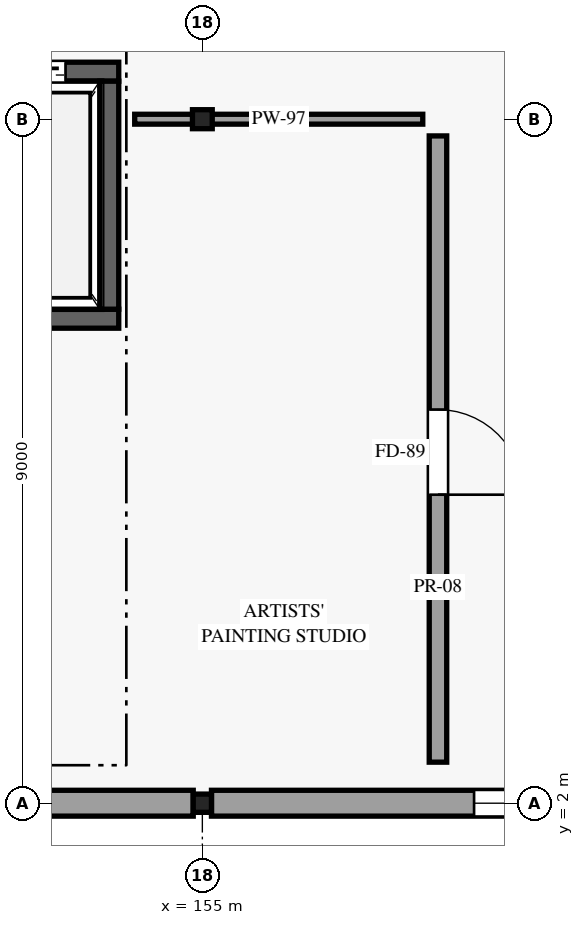
"""IFC4 building model, lengths in metres.
Left out: names, types, materials, properties, quantities, classifications, styles, units other than length and angle.
Written with IfcOpenShell. Run it as: python <this file> out.ifc"""

import sys

from ifc_helpers import new_model, si_unit, direction, frame, frame_2d, origin, origin_2d, place, context, subcontext, project, spatial, rectangle, i_section, extrude, element, fill, save


model = new_model("IFC4")
c1 = context("Model", 3, precision=1e-05, world=origin(), true_north=direction((0.0, 1.0)))
c2 = subcontext(c1, "Body", "Model", "MODEL_VIEW")
j1 = project(units=[si_unit("LENGTHUNIT", "METRE"), si_unit("PLANEANGLEUNIT", "RADIAN")], contexts=[c1])
p1 = place(None, origin())
s1 = spatial("IfcSite", under=j1, at=p1, CompositionType="ELEMENT")
p2 = place(p1, origin())
s2 = spatial("IfcBuilding", under=s1, at=p2, CompositionType="ELEMENT")
p3 = place(p2, frame((0.0, 0.0, 15.0)))
s3 = spatial("IfcBuildingStorey", under=s2, at=p3, CompositionType="ELEMENT", Elevation=15.0)
p4 = place(p3, frame((155.0, 2.0, 0.0), z_axis=(0.0, 0.0, 1.0), x_axis=(1.0, 0.0, 0.0)))
e1 = element("IfcColumn", 1, at=p4, inside=s3, PredefinedType="COLUMN", context=c2, shape_type="SweptSolid", body=[
    extrude(i_section(OverallWidth=0.24, OverallDepth=0.24, WebThickness=0.01, FlangeThickness=0.017, FilletRadius=0.021, at=origin_2d()), origin(), (0.0, 0.0, 1.0), 4.5),
])
p5 = place(p3, frame((155.0, 11.0, 0.0), z_axis=(0.0, 0.0, 1.0), x_axis=(1.0, 0.0, 0.0)))
e2 = element("IfcColumn", 2, at=p5, inside=s3, PredefinedType="COLUMN", context=c2, shape_type="SweptSolid", body=[
    extrude(i_section(OverallWidth=0.26, OverallDepth=0.25, WebThickness=0.008, FlangeThickness=0.012, FilletRadius=0.024, at=origin_2d()), origin(), (0.0, 0.0, 1.0), 4.5),
])
p6 = place(p3, frame((146.12, 2.0, 0.0), z_axis=(0.0, 0.0, 1.0), x_axis=(1.0, 0.0, 0.0)))
e3 = element("IfcWall", 3, at=p6, inside=s3, PredefinedType="STANDARD", context=c2, shape_type="SweptSolid", body=[
    extrude(rectangle(XDim=8.76, YDim=0.34, at=frame_2d((4.38, 0.0))), origin(), (0.0, 0.0, 1.0), 3.855),
])
p7 = place(p6, frame((5.205, 0.0, 0.85), z_axis=(0.0, 0.0, 1.0), x_axis=(-1.0, 0.0, 0.0)))
e4 = element("IfcOpeningElement", 4, at=p7, cuts=e3, PredefinedType="OPENING", context=c2, shape_type="SweptSolid", body=[
    extrude(rectangle(XDim=1.65, YDim=2.0, at=frame_2d((0.825, 1.0))), frame((0.0, 0.18, 0.0), z_axis=(0.0, -1.0, 0.0), x_axis=(1.0, 0.0, 0.0)), (0.0, 0.0, 1.0), 0.36),
])
p8 = place(p3, frame((155.12, 2.0, 0.0), z_axis=(0.0, 0.0, 1.0), x_axis=(1.0, 0.0, 0.0)))
e5 = element("IfcWall", 5, at=p8, inside=s3, PredefinedType="STANDARD", context=c2, shape_type="SweptSolid", body=[
    extrude(rectangle(XDim=8.76, YDim=0.34, at=frame_2d((4.38, 0.0))), origin(), (0.0, 0.0, 1.0), 3.855),
])
p9 = place(p8, frame((5.305, 0.0, 0.85), z_axis=(0.0, 0.0, 1.0), x_axis=(-1.0, 0.0, 0.0)))
e6 = element("IfcOpeningElement", 6, at=p9, cuts=e5, PredefinedType="OPENING", context=c2, shape_type="SweptSolid", body=[
    extrude(rectangle(XDim=1.85, YDim=2.1, at=frame_2d((0.925, 1.05))), frame((0.0, 0.18, 0.0), z_axis=(0.0, -1.0, 0.0), x_axis=(1.0, 0.0, 0.0)), (0.0, 0.0, 1.0), 0.36),
])
p10 = place(p3, frame((151.4, 11.625, 0.0), z_axis=(0.0, 0.0, 1.0), x_axis=(1.0, 0.0, 0.0)))
e7 = element("IfcWall", 7, at=p10, inside=s3, PredefinedType="SHEAR", context=c2, shape_type="SweptSolid", body=[
    extrude(rectangle(XDim=2.5, YDim=0.25, at=frame_2d((1.25, 0.0))), origin(), (0.0, 0.0, 1.0), 4.18),
])
p11 = place(p10, frame((0.7, 0.0, 0.0)))
e8 = element("IfcOpeningElement", 8, at=p11, cuts=e7, PredefinedType="OPENING", context=c2, shape_type="SweptSolid", body=[
    extrude(rectangle(XDim=1.1, YDim=2.2, at=frame_2d((0.55, 1.1))), frame((0.0, 0.135, 0.0), z_axis=(0.0, -1.0, 0.0), x_axis=(1.0, 0.0, 0.0)), (0.0, 0.0, 1.0), 0.27),
])
p12 = place(p3, frame((151.4, 8.375, 0.0), z_axis=(0.0, 0.0, 1.0), x_axis=(1.0, 0.0, 0.0)))
e9 = element("IfcWall", 9, at=p12, inside=s3, PredefinedType="SHEAR", context=c2, shape_type="SweptSolid", body=[
    extrude(rectangle(XDim=2.5, YDim=0.25, at=frame_2d((1.25, 0.0))), origin(), (0.0, 0.0, 1.0), 4.18),
])
p13 = place(p3, frame((153.775, 8.5, 0.0), z_axis=(0.0, 0.0, 1.0), x_axis=(0.0, 1.0, 0.0)))
e10 = element("IfcWall", 10, at=p13, inside=s3, PredefinedType="SHEAR", context=c2, shape_type="SweptSolid", body=[
    extrude(rectangle(XDim=3.0, YDim=0.25, at=frame_2d((1.5, 0.0))), origin(), (0.0, 0.0, 1.0), 4.18),
])
p14 = place(p3, frame((158.1, 2.54, 0.0), z_axis=(0.0, 0.0, 1.0), x_axis=(0.0, 1.0, 0.0)))
e11 = element("IfcWall", 11, at=p14, inside=s3, PredefinedType="PARTITIONING", context=c2, shape_type="SweptSolid", body=[
    extrude(rectangle(XDim=8.24, YDim=0.23, at=frame_2d((4.12, 0.0))), origin(), (0.0, 0.0, 1.0), 3.855),
])
p15 = place(p14, frame((4.639, 0.0, 0.0), z_axis=(0.0, 0.0, 1.0), x_axis=(-1.0, 0.0, 0.0)))
e12 = element("IfcOpeningElement", 12, at=p15, cuts=e11, PredefinedType="OPENING", context=c2, shape_type="SweptSolid", body=[
    extrude(rectangle(XDim=1.12, YDim=2.26, at=frame_2d((0.56, 1.13))), frame((0.0, 0.125, 0.0), z_axis=(0.0, -1.0, 0.0), x_axis=(1.0, 0.0, 0.0)), (0.0, 0.0, 1.0), 0.25),
])
p16 = place(p3, frame((154.11, 11.0, 0.0), z_axis=(0.0, 0.0, 1.0), x_axis=(1.0, 0.0, 0.0)))
e13 = element("IfcWall", 13, at=p16, inside=s3, PredefinedType="PARTITIONING", context=c2, shape_type="SweptSolid", body=[
    extrude(rectangle(XDim=3.79, YDim=0.13, at=frame_2d((1.895, 0.0))), origin(), (0.0, 0.0, 1.0), 3.855),
])
p17 = place(p9, origin())
e14 = element("IfcWindow", 14, at=p17, inside=s3, PartitioningType="SINGLE_PANEL", PredefinedType="WINDOW", context=c2, shape_type="SweptSolid", body=[
    extrude(rectangle(XDim=1.85, YDim=2.1, at=frame_2d((0.925, 1.05))), frame((0.0, 0.03, 0.0), z_axis=(0.0, -1.0, 0.0), x_axis=(1.0, 0.0, 0.0)), (0.0, 0.0, 1.0), 0.06),
])
fill(e6, e14)
p18 = place(p11, origin())
e15 = element("IfcDoor", 15, at=p18, inside=s3, OperationType="SLIDING_TO_LEFT", PredefinedType="DOOR", context=c2, shape_type="SweptSolid", body=[
    extrude(rectangle(XDim=1.1, YDim=2.2, at=frame_2d((0.55, 1.1))), frame((0.0, 0.025, 0.0), z_axis=(0.0, -1.0, 0.0), x_axis=(1.0, 0.0, 0.0)), (0.0, 0.0, 1.0), 0.05),
])
fill(e8, e15)
p19 = place(p15, origin())
e16 = element("IfcDoor", 16, at=p19, inside=s3, OperationType="SINGLE_SWING_RIGHT", PredefinedType="DOOR", context=c2, shape_type="SweptSolid", body=[
    extrude(rectangle(XDim=1.12, YDim=2.26, at=frame_2d((0.56, 1.13))), frame((0.0, 0.025, 0.0), z_axis=(0.0, -1.0, 0.0), x_axis=(1.0, 0.0, 0.0)), (0.0, 0.0, 1.0), 0.05),
])
fill(e12, e16)
save(model, sys.argv[1])
